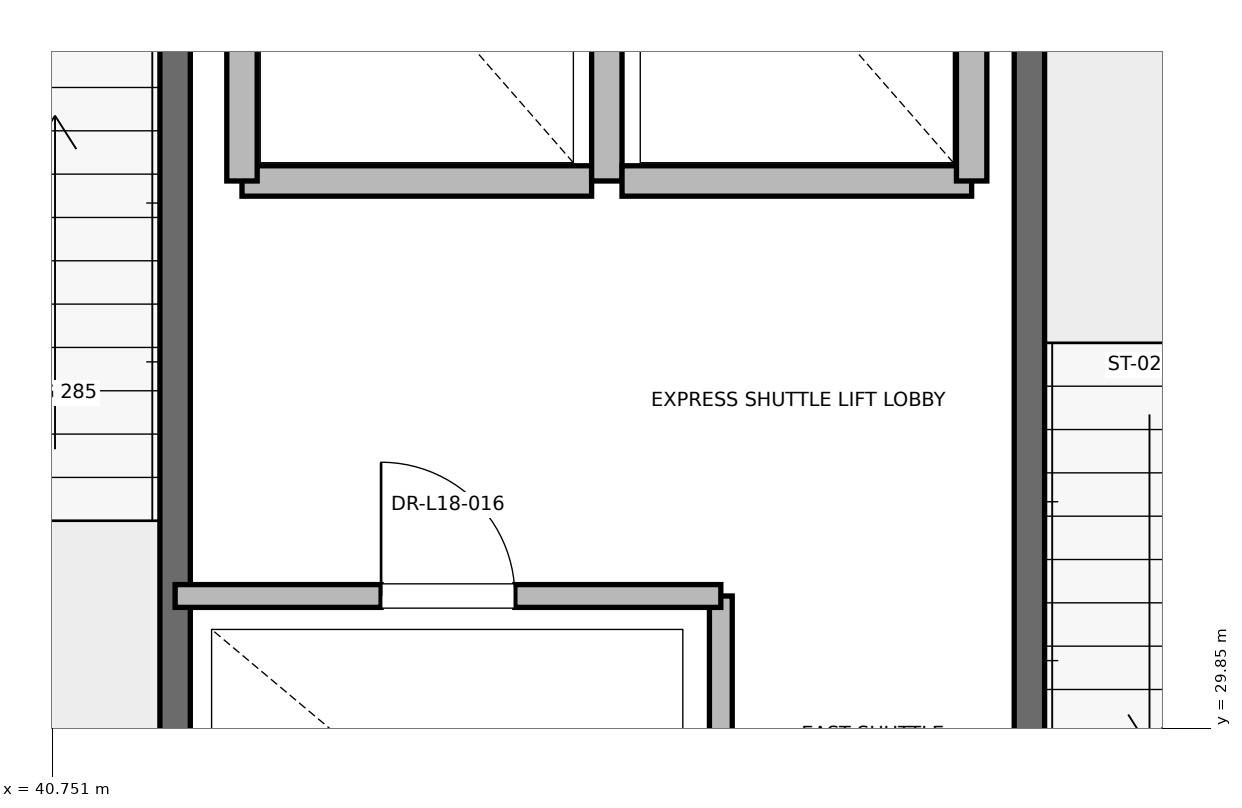
"""IFC4 building model, lengths in metres.
Left out: names, types, materials, properties, quantities, classifications, styles, units other than length and angle.
Written with IfcOpenShell. Run it as: python <this file> out.ifc"""

import sys

from ifc_helpers import new_model, si_unit, direction, frame, frame_2d, origin, place, context, subcontext, project, spatial, rectangle, extrude, element, fill, save


model = new_model("IFC4")
c1 = context("Model", 3, precision=1e-05, world=origin(), true_north=direction((0.0, 1.0)))
c2 = subcontext(c1, "Body", "Model", "MODEL_VIEW")
j1 = project(units=[si_unit("LENGTHUNIT", "METRE"), si_unit("PLANEANGLEUNIT", "RADIAN")], contexts=[c1])
p1 = place(None, origin())
s1 = spatial("IfcSite", under=j1, at=p1, CompositionType="ELEMENT")
p2 = place(p1, origin())
s2 = spatial("IfcBuilding", under=s1, at=p2, CompositionType="ELEMENT")
p3 = place(p2, frame((0.0, 0.0, 79.6)))
s3 = spatial("IfcBuildingStorey", under=s2, at=p3, CompositionType="ELEMENT", Elevation=79.6)
p4 = place(p3, frame((47.18, 27.62, 0.0), z_axis=(0.0, 0.0, 1.0), x_axis=(0.0, 1.0, 0.0)))
e1 = element("IfcWall", 1, at=p4, inside=s3, PredefinedType="SOLIDWALL", context=c2, shape_type="SweptSolid", body=[
    extrude(rectangle(XDim=8.18, YDim=0.2, at=frame_2d((4.09, 0.0))), origin(), (0.0, 0.0, 1.0), 3.76),
])
p5 = place(p3, frame((41.56, 27.68, 0.0), z_axis=(0.0, 0.0, 1.0), x_axis=(0.0, 1.0, 0.0)))
e2 = element("IfcWall", 2, at=p5, inside=s3, PredefinedType="SOLIDWALL", context=c2, shape_type="SweptSolid", body=[
    extrude(rectangle(XDim=8.57, YDim=0.2, at=frame_2d((4.285, 0.0))), origin(), (0.0, 0.0, 1.0), 3.76),
])
p6 = place(p3, frame((42.0, 33.45, 0.0), z_axis=(0.0, 0.0, 1.0), x_axis=(1.0, 0.0, 0.0)))
e3 = element("IfcWall", 3, at=p6, inside=s3, PredefinedType="SOLIDWALL", context=c2, shape_type="SweptSolid", body=[
    extrude(rectangle(XDim=2.3, YDim=0.2, at=frame_2d((1.15, 0.0))), origin(), (0.0, 0.0, 1.0), 3.76),
])
for number, where, z_axis, x_axis in (
    (4, (42.0, 36.05, 0.0), (0.0, 0.0, 1.0), (0.0, -1.0, 0.0)),
    (5, (44.4, 33.45, 0.0), (0.0, 0.0, 1.0), (0.0, 1.0, 0.0)),
):
    element("IfcWall", number, at=place(p3, frame(where, z_axis=z_axis, x_axis=x_axis)), inside=s3, PredefinedType="SOLIDWALL", context=c2, shape_type="SweptSolid", body=[
        extrude(rectangle(XDim=2.6, YDim=0.2, at=frame_2d((1.3, 0.0))), origin(), (0.0, 0.0, 1.0), 2.54),
    ])
p7 = place(p3, frame((44.5, 33.45, 0.0), z_axis=(0.0, 0.0, 1.0), x_axis=(1.0, 0.0, 0.0)))
e6 = element("IfcWall", 6, at=p7, inside=s3, PredefinedType="SOLIDWALL", context=c2, shape_type="SweptSolid", body=[
    extrude(rectangle(XDim=2.3, YDim=0.2, at=frame_2d((1.15, 0.0))), origin(), (0.0, 0.0, 1.0), 3.76),
])
p8 = place(p3, frame((46.8, 33.45, 0.0), z_axis=(0.0, 0.0, 1.0), x_axis=(0.0, 1.0, 0.0)))
e7 = element("IfcWall", 7, at=p8, inside=s3, PredefinedType="SOLIDWALL", context=c2, shape_type="SweptSolid", body=[
    extrude(rectangle(XDim=2.6, YDim=0.2, at=frame_2d((1.3, 0.0))), origin(), (0.0, 0.0, 1.0), 3.76),
])
p9 = place(p3, frame((45.15, 27.62, 0.0), z_axis=(0.0, 0.0, 1.0), x_axis=(0.0, 1.0, 0.0)))
e8 = element("IfcWall", 8, at=p9, inside=s3, PredefinedType="PARTITIONING", context=c2, shape_type="SweptSolid", body=[
    extrude(rectangle(XDim=3.1, YDim=0.15, at=frame_2d((1.55, 0.0))), origin(), (0.0, 0.0, 1.0), 2.85),
])
p10 = place(p3, frame((41.56, 30.72, 0.0), z_axis=(0.0, 0.0, 1.0), x_axis=(1.0, 0.0, 0.0)))
e9 = element("IfcWall", 9, at=p10, inside=s3, PredefinedType="PARTITIONING", context=c2, shape_type="SweptSolid", body=[
    extrude(rectangle(XDim=3.59, YDim=0.15, at=frame_2d((1.795, 0.0))), origin(), (0.0, 0.0, 1.0), 2.85),
])
p11 = place(p10, frame((1.355, 0.0, 0.0)))
e10 = element("IfcOpeningElement", 10, at=p11, cuts=e9, PredefinedType="OPENING", context=c2, shape_type="SweptSolid", body=[
    extrude(rectangle(XDim=0.88, YDim=2.1, at=frame_2d((0.44, 1.05))), frame((0.0, 0.075, 0.0), z_axis=(0.0, -1.0, 0.0), x_axis=(1.0, 0.0, 0.0)), (0.0, 0.0, 1.0), 0.15),
])
p12 = place(p11, origin())
e11 = element("IfcDoor", 11, at=p12, inside=s3, OperationType="SINGLE_SWING_LEFT", PredefinedType="DOOR", context=c2, shape_type="SweptSolid", body=[
    extrude(rectangle(XDim=0.88, YDim=2.1, at=frame_2d((0.44, 1.05))), frame((0.0, 0.025, 0.0), z_axis=(0.0, -1.0, 0.0), x_axis=(1.0, 0.0, 0.0)), (0.0, 0.0, 1.0), 0.05),
])
fill(e10, e11)
save(model, sys.argv[1])
